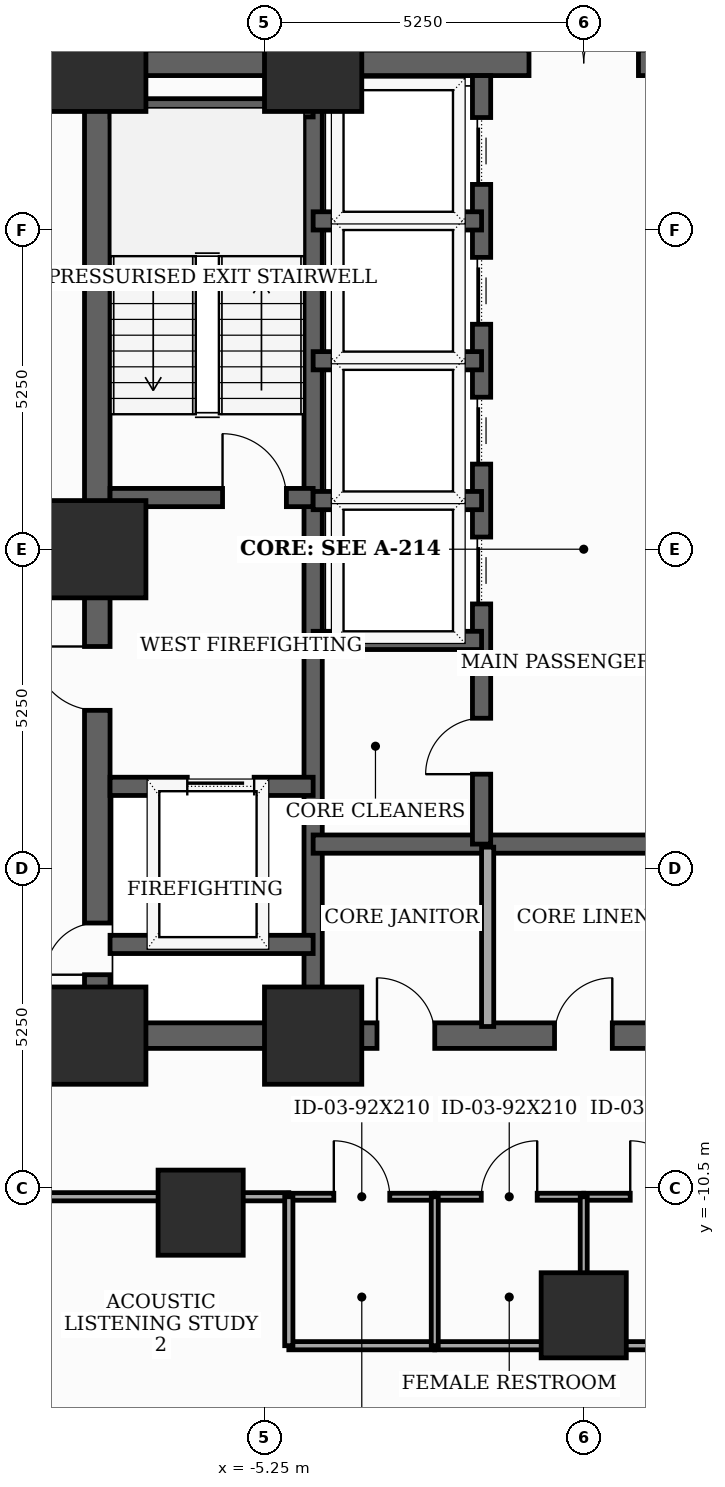
"""IFC4 building model, lengths in metres.
Left out: names, types, materials, properties, quantities, classifications, styles, units other than length and angle.
Written with IfcOpenShell. Run it as: python <this file> out.ifc"""

import sys

from ifc_helpers import new_model, si_unit, direction, frame, frame_2d, origin, origin_2d, place, context, subcontext, project, spatial, rectangle, extrude, element, fill, save


model = new_model("IFC4")
c1 = context("Model", 3, precision=1e-05, world=origin(), true_north=direction((0.0, 1.0)))
c2 = subcontext(c1, "Body", "Model", "MODEL_VIEW")
j1 = project(units=[si_unit("LENGTHUNIT", "METRE"), si_unit("PLANEANGLEUNIT", "RADIAN")], contexts=[c1])
p1 = place(None, origin())
s1 = spatial("IfcSite", under=j1, at=p1, CompositionType="ELEMENT")
p2 = place(p1, origin())
s2 = spatial("IfcBuilding", under=s1, at=p2, CompositionType="ELEMENT")
p3 = place(p2, frame((0.0, 0.0, 70.4)))
s3 = spatial("IfcBuildingStorey", under=s2, at=p3, CompositionType="ELEMENT", Elevation=70.4)
for number, where, z_axis, x_axis in (
    (1, (-8.0, -8.0, 0.0), (0.0, 0.0, 1.0), (1.0, 0.0, 0.0)),
    (2, (-4.45, -8.0, 0.0), (0.0, 0.0, 1.0), (1.0, 0.0, 0.0)),
    (3, (-4.45, 8.0, 0.0), (0.0, 0.0, 1.0), (1.0, 0.0, 0.0)),
    (4, (-8.0, 8.0, 0.0), (0.0, 0.0, 1.0), (1.0, 0.0, 0.0)),
    (5, (-8.0, 0.0, 0.0), (0.0, 0.0, 1.0), (1.0, 0.0, 0.0)),
):
    element("IfcColumn", number, at=place(p3, frame(where, z_axis=z_axis, x_axis=x_axis)), inside=s3, PredefinedType="COLUMN", context=c2, shape_type="SweptSolid", body=[
        extrude(rectangle(XDim=1.6, YDim=1.6, at=origin_2d()), origin(), (0.0, 0.0, 1.0), 3.7),
    ])
for number, where, z_axis, x_axis in (
    (6, (-6.3, -10.912, 0.0), (0.0, 0.0, 1.0), (1.0, 0.0, 0.0)),
    (7, (0.0, -12.6, 0.0), (0.0, 0.0, 1.0), (1.0, 0.0, 0.0)),
):
    element("IfcColumn", number, at=place(p3, frame(where, z_axis=z_axis, x_axis=x_axis)), inside=s3, PredefinedType="COLUMN", context=c2, shape_type="SweptSolid", body=[
        extrude(rectangle(XDim=1.4, YDim=1.4, at=origin_2d()), origin(), (0.0, 0.0, 1.0), 3.7),
    ])
p4 = place(p3, frame((-8.0, -8.0, 0.0), z_axis=(0.0, 0.0, 1.0), x_axis=(0.0, 1.0, 0.0)))
e8 = element("IfcWall", 8, at=p4, inside=s3, PredefinedType="SHEAR", context=c2, shape_type="SweptSolid", body=[
    extrude(rectangle(XDim=16.0, YDim=0.42, at=frame_2d((8.0, 0.0))), origin(), (0.0, 0.0, 1.0), 3.5),
])
p5 = place(p4, frame((1.002, 0.0, 0.0)))
e9 = element("IfcOpeningElement", 9, at=p5, cuts=e8, PredefinedType="OPENING", context=c2, shape_type="SweptSolid", body=[
    extrude(rectangle(XDim=0.85, YDim=2.02, at=frame_2d((0.425, 1.01))), frame((0.0, 0.22, 0.0), z_axis=(0.0, -1.0, 0.0), x_axis=(1.0, 0.0, 0.0)), (0.0, 0.0, 1.0), 0.44),
])
p6 = place(p4, frame((5.35, 0.0, 0.0)))
e10 = element("IfcOpeningElement", 10, at=p6, cuts=e8, PredefinedType="OPENING", context=c2, shape_type="SweptSolid", body=[
    extrude(rectangle(XDim=1.05, YDim=2.15, at=frame_2d((0.525, 1.075))), frame((0.0, 0.22, 0.0), z_axis=(0.0, -1.0, 0.0), x_axis=(1.0, 0.0, 0.0)), (0.0, 0.0, 1.0), 0.44),
])
p7 = place(p3, frame((-8.0, -8.0, 0.0), z_axis=(0.0, 0.0, 1.0), x_axis=(1.0, 0.0, 0.0)))
e11 = element("IfcWall", 11, at=p7, inside=s3, PredefinedType="SHEAR", context=c2, shape_type="SweptSolid", body=[
    extrude(rectangle(XDim=16.0, YDim=0.42, at=frame_2d((8.0, 0.0))), origin(), (0.0, 0.0, 1.0), 3.5),
])
p8 = place(p7, frame((4.6, 0.0, 0.0)))
e12 = element("IfcOpeningElement", 12, at=p8, cuts=e11, PredefinedType="OPENING", context=c2, shape_type="SweptSolid", body=[
    extrude(rectangle(XDim=0.95, YDim=2.1, at=frame_2d((0.475, 1.05))), frame((0.0, 0.22, 0.0), z_axis=(0.0, -1.0, 0.0), x_axis=(1.0, 0.0, 0.0)), (0.0, 0.0, 1.0), 0.44),
])
p9 = place(p7, frame((7.52, 0.0, 0.0)))
e13 = element("IfcOpeningElement", 13, at=p9, cuts=e11, PredefinedType="OPENING", context=c2, shape_type="SweptSolid", body=[
    extrude(rectangle(XDim=0.95, YDim=2.1, at=frame_2d((0.475, 1.05))), frame((0.0, 0.22, 0.0), z_axis=(0.0, -1.0, 0.0), x_axis=(1.0, 0.0, 0.0)), (0.0, 0.0, 1.0), 0.44),
])
p10 = place(p7, frame((10.45, 0.0, 0.0)))
e14 = element("IfcOpeningElement", 14, at=p10, cuts=e11, PredefinedType="OPENING", context=c2, shape_type="SweptSolid", body=[
    extrude(rectangle(XDim=0.95, YDim=2.1, at=frame_2d((0.475, 1.05))), frame((0.0, 0.22, 0.0), z_axis=(0.0, -1.0, 0.0), x_axis=(1.0, 0.0, 0.0)), (0.0, 0.0, 1.0), 0.44),
])
p11 = place(p3, frame((-8.0, 8.0, 0.0), z_axis=(0.0, 0.0, 1.0), x_axis=(1.0, 0.0, 0.0)))
e15 = element("IfcWall", 15, at=p11, inside=s3, PredefinedType="SHEAR", context=c2, shape_type="SweptSolid", body=[
    extrude(rectangle(XDim=16.0, YDim=0.42, at=frame_2d((8.0, 0.0))), origin(), (0.0, 0.0, 1.0), 3.5),
])
p12 = place(p11, frame((7.1, 0.0, 0.0)))
e16 = element("IfcOpeningElement", 16, at=p12, cuts=e15, PredefinedType="OPENING", context=c2, shape_type="SweptSolid", body=[
    extrude(rectangle(XDim=1.8, YDim=2.15, at=frame_2d((0.9, 1.075))), frame((0.0, 0.22, 0.0), z_axis=(0.0, -1.0, 0.0), x_axis=(1.0, 0.0, 0.0)), (0.0, 0.0, 1.0), 0.44),
])
p13 = place(p3, frame((-4.45, -7.79, 0.0), z_axis=(0.0, 0.0, 1.0), x_axis=(0.0, 1.0, 0.0)))
e17 = element("IfcWall", 17, at=p13, inside=s3, PredefinedType="SHEAR", context=c2, shape_type="SweptSolid", body=[
    extrude(rectangle(XDim=15.58, YDim=0.3, at=frame_2d((7.79, 0.0))), origin(), (0.0, 0.0, 1.0), 3.5),
])
p14 = place(p3, frame((-7.79, 0.85, 0.0), z_axis=(0.0, 0.0, 1.0), x_axis=(1.0, 0.0, 0.0)))
e18 = element("IfcWall", 18, at=p14, inside=s3, PredefinedType="SHEAR", context=c2, shape_type="SweptSolid", body=[
    extrude(rectangle(XDim=3.34, YDim=0.3, at=frame_2d((1.67, 0.0))), origin(), (0.0, 0.0, 1.0), 3.5),
])
p15 = place(p14, frame((1.85, 0.0, 0.0)))
e19 = element("IfcOpeningElement", 19, at=p15, cuts=e18, PredefinedType="OPENING", context=c2, shape_type="SweptSolid", body=[
    extrude(rectangle(XDim=1.05, YDim=2.15, at=frame_2d((0.525, 1.075))), frame((0.0, 0.16, 0.0), z_axis=(0.0, -1.0, 0.0), x_axis=(1.0, 0.0, 0.0)), (0.0, 0.0, 1.0), 0.32),
])
p16 = place(p3, frame((-7.79, 7.26, 0.0), z_axis=(0.0, 0.0, 1.0), x_axis=(1.0, 0.0, 0.0)))
e20 = element("IfcWall", 20, at=p16, inside=s3, PredefinedType="SHEAR", context=c2, shape_type="SweptSolid", body=[
    extrude(rectangle(XDim=3.34, YDim=0.3, at=frame_2d((1.67, 0.0))), origin(), (0.0, 0.0, 1.0), 3.5),
])
p17 = place(p3, frame((-7.79, -3.9, 0.0), z_axis=(0.0, 0.0, 1.0), x_axis=(1.0, 0.0, 0.0)))
e21 = element("IfcWall", 21, at=p17, inside=s3, PredefinedType="SHEAR", context=c2, shape_type="SweptSolid", body=[
    extrude(rectangle(XDim=3.34, YDim=0.3, at=frame_2d((1.67, 0.0))), origin(), (0.0, 0.0, 1.0), 3.5),
])
p18 = place(p17, frame((1.27, 0.0, 0.0)))
e22 = element("IfcOpeningElement", 22, at=p18, cuts=e21, PredefinedType="OPENING", context=c2, shape_type="SweptSolid", body=[
    extrude(rectangle(XDim=1.1, YDim=2.1, at=frame_2d((0.55, 1.05))), frame((0.0, 0.16, 0.0), z_axis=(0.0, -1.0, 0.0), x_axis=(1.0, 0.0, 0.0)), (0.0, 0.0, 1.0), 0.32),
])
p19 = place(p3, frame((-7.79, -6.5, 0.0), z_axis=(0.0, 0.0, 1.0), x_axis=(1.0, 0.0, 0.0)))
e23 = element("IfcWall", 23, at=p19, inside=s3, PredefinedType="SHEAR", context=c2, shape_type="SweptSolid", body=[
    extrude(rectangle(XDim=3.34, YDim=0.3, at=frame_2d((1.67, 0.0))), origin(), (0.0, 0.0, 1.0), 3.5),
])
p20 = place(p3, frame((-4.45, -4.85, 0.0), z_axis=(0.0, 0.0, 1.0), x_axis=(1.0, 0.0, 0.0)))
e24 = element("IfcWall", 24, at=p20, inside=s3, PredefinedType="SHEAR", context=c2, shape_type="SweptSolid", body=[
    extrude(rectangle(XDim=8.9, YDim=0.3, at=frame_2d((4.45, 0.0))), origin(), (0.0, 0.0, 1.0), 3.5),
])
p21 = place(p3, frame((-1.68, -4.85, 0.0), z_axis=(0.0, 0.0, 1.0), x_axis=(0.0, 1.0, 0.0)))
e25 = element("IfcWall", 25, at=p21, inside=s3, PredefinedType="SHEAR", context=c2, shape_type="SweptSolid", body=[
    extrude(rectangle(XDim=12.64, YDim=0.3, at=frame_2d((6.32, 0.0))), origin(), (0.0, 0.0, 1.0), 3.5),
])
p22 = place(p21, frame((3.95, 0.0, 0.0)))
e26 = element("IfcOpeningElement", 26, at=p22, cuts=e25, PredefinedType="OPENING", context=c2, shape_type="SweptSolid", body=[
    extrude(rectangle(XDim=1.1, YDim=2.1, at=frame_2d((0.55, 1.05))), frame((0.0, 0.16, 0.0), z_axis=(0.0, -1.0, 0.0), x_axis=(1.0, 0.0, 0.0)), (0.0, 0.0, 1.0), 0.32),
])
p23 = place(p21, frame((6.25, 0.0, 0.0)))
e27 = element("IfcOpeningElement", 27, at=p23, cuts=e25, PredefinedType="OPENING", context=c2, shape_type="SweptSolid", body=[
    extrude(rectangle(XDim=1.1, YDim=2.1, at=frame_2d((0.55, 1.05))), frame((0.0, 0.16, 0.0), z_axis=(0.0, -1.0, 0.0), x_axis=(1.0, 0.0, 0.0)), (0.0, 0.0, 1.0), 0.32),
])
p24 = place(p21, frame((8.55, 0.0, 0.0)))
e28 = element("IfcOpeningElement", 28, at=p24, cuts=e25, PredefinedType="OPENING", context=c2, shape_type="SweptSolid", body=[
    extrude(rectangle(XDim=1.1, YDim=2.1, at=frame_2d((0.55, 1.05))), frame((0.0, 0.16, 0.0), z_axis=(0.0, -1.0, 0.0), x_axis=(1.0, 0.0, 0.0)), (0.0, 0.0, 1.0), 0.32),
])
p25 = place(p21, frame((10.85, 0.0, 0.0)))
e29 = element("IfcOpeningElement", 29, at=p25, cuts=e25, PredefinedType="OPENING", context=c2, shape_type="SweptSolid", body=[
    extrude(rectangle(XDim=1.1, YDim=2.1, at=frame_2d((0.55, 1.05))), frame((0.0, 0.16, 0.0), z_axis=(0.0, -1.0, 0.0), x_axis=(1.0, 0.0, 0.0)), (0.0, 0.0, 1.0), 0.32),
])
p26 = place(p21, frame((1.15, 0.0, 0.0)))
e30 = element("IfcOpeningElement", 30, at=p26, cuts=e25, PredefinedType="OPENING", context=c2, shape_type="SweptSolid", body=[
    extrude(rectangle(XDim=0.92, YDim=2.1, at=frame_2d((0.46, 1.05))), frame((0.0, 0.16, 0.0), z_axis=(0.0, -1.0, 0.0), x_axis=(1.0, 0.0, 0.0)), (0.0, 0.0, 1.0), 0.32),
])
for number, where, z_axis, x_axis in (
    (31, (-4.45, -1.5, 0.0), (0.0, 0.0, 1.0), (1.0, 0.0, 0.0)),
    (32, (-4.45, 0.8, 0.0), (0.0, 0.0, 1.0), (1.0, 0.0, 0.0)),
    (33, (-4.45, 3.1, 0.0), (0.0, 0.0, 1.0), (1.0, 0.0, 0.0)),
    (34, (-4.45, 5.4, 0.0), (0.0, 0.0, 1.0), (1.0, 0.0, 0.0)),
):
    element("IfcWall", number, at=place(p3, frame(where, z_axis=z_axis, x_axis=x_axis)), inside=s3, PredefinedType="SHEAR", context=c2, shape_type="SweptSolid", body=[
        extrude(rectangle(XDim=2.77, YDim=0.3, at=frame_2d((1.385, 0.0))), origin(), (0.0, 0.0, 1.0), 3.5),
    ])
p27 = place(p3, frame((-1.58, -7.85, 0.0), z_axis=(0.0, 0.0, 1.0), x_axis=(0.0, 1.0, 0.0)))
e35 = element("IfcWall", 35, at=p27, inside=s3, PredefinedType="SOLIDWALL", context=c2, shape_type="SweptSolid", body=[
    extrude(rectangle(XDim=2.95, YDim=0.2, at=frame_2d((1.475, 0.0))), origin(), (0.0, 0.0, 1.0), 2.885),
])
p28 = place(p3, frame((-10.15, -10.65, 0.0), z_axis=(0.0, 0.0, 1.0), x_axis=(1.0, 0.0, 0.0)))
e36 = element("IfcWall", 36, at=p28, inside=s3, PredefinedType="PARTITIONING", context=c2, shape_type="SweptSolid", body=[
    extrude(rectangle(XDim=5.3, YDim=0.135, at=frame_2d((2.65, 0.0))), origin(), (0.0, 0.0, 1.0), 2.785),
])
p29 = place(p3, frame((-4.85, -10.65, 0.0), z_axis=(0.0, 0.0, 1.0), x_axis=(1.0, 0.0, 0.0)))
e37 = element("IfcWall", 37, at=p29, inside=s3, PredefinedType="PARTITIONING", context=c2, shape_type="SweptSolid", body=[
    extrude(rectangle(XDim=2.4, YDim=0.115, at=frame_2d((1.2, 0.0))), origin(), (0.0, 0.0, 1.0), 3.5),
])
p30 = place(p29, frame((0.74, 0.0, 0.0)))
e38 = element("IfcOpeningElement", 38, at=p30, cuts=e37, PredefinedType="OPENING", context=c2, shape_type="SweptSolid", body=[
    extrude(rectangle(XDim=0.92, YDim=2.1, at=frame_2d((0.46, 1.05))), frame((0.0, 0.067, 0.0), z_axis=(0.0, -1.0, 0.0), x_axis=(1.0, 0.0, 0.0)), (0.0, 0.0, 1.0), 0.135),
])
p31 = place(p3, frame((-2.45, -10.65, 0.0), z_axis=(0.0, 0.0, 1.0), x_axis=(1.0, 0.0, 0.0)))
e39 = element("IfcWall", 39, at=p31, inside=s3, PredefinedType="PARTITIONING", context=c2, shape_type="SweptSolid", body=[
    extrude(rectangle(XDim=2.45, YDim=0.115, at=frame_2d((1.225, 0.0))), origin(), (0.0, 0.0, 1.0), 2.785),
])
p32 = place(p31, frame((0.765, 0.0, 0.0)))
e40 = element("IfcOpeningElement", 40, at=p32, cuts=e39, PredefinedType="OPENING", context=c2, shape_type="SweptSolid", body=[
    extrude(rectangle(XDim=0.92, YDim=2.1, at=frame_2d((0.46, 1.05))), frame((0.0, 0.067, 0.0), z_axis=(0.0, -1.0, 0.0), x_axis=(1.0, 0.0, 0.0)), (0.0, 0.0, 1.0), 0.135),
])
p33 = place(p3, frame((0.0, -10.65, 0.0), z_axis=(0.0, 0.0, 1.0), x_axis=(1.0, 0.0, 0.0)))
e41 = element("IfcWall", 41, at=p33, inside=s3, PredefinedType="PARTITIONING", context=c2, shape_type="SweptSolid", body=[
    extrude(rectangle(XDim=2.45, YDim=0.115, at=frame_2d((1.225, 0.0))), origin(), (0.0, 0.0, 1.0), 3.5),
])
p34 = place(p33, frame((0.765, 0.0, 0.0)))
e42 = element("IfcOpeningElement", 42, at=p34, cuts=e41, PredefinedType="OPENING", context=c2, shape_type="SweptSolid", body=[
    extrude(rectangle(XDim=0.92, YDim=2.1, at=frame_2d((0.46, 1.05))), frame((0.0, 0.067, 0.0), z_axis=(0.0, -1.0, 0.0), x_axis=(1.0, 0.0, 0.0)), (0.0, 0.0, 1.0), 0.135),
])
p35 = place(p3, frame((-9.328, -14.093, 0.0), z_axis=(0.0, 0.0, 1.0), x_axis=(0.928830986118, -0.370503710139, 0.0)))
e43 = element("IfcWall", 43, at=p35, inside=s3, PredefinedType="PARTITIONING", context=c2, shape_type="SweptSolid", body=[
    extrude(rectangle(XDim=6.883, YDim=0.135, at=frame_2d((3.441, 0.0))), origin(), (0.0, 0.0, 1.0), 2.785),
])
p36 = place(p3, frame((-2.45, -13.1, 0.0), z_axis=(0.0, 0.0, 1.0), x_axis=(-1.0, 0.0, 0.0)))
e44 = element("IfcWall", 44, at=p36, inside=s3, PredefinedType="PARTITIONING", context=c2, shape_type="SweptSolid", body=[
    extrude(rectangle(XDim=2.4, YDim=0.135, at=frame_2d((1.2, 0.0))), origin(), (0.0, 0.0, 1.0), 3.5),
])
p37 = place(p3, frame((-4.85, -13.1, 0.0), z_axis=(0.0, 0.0, 1.0), x_axis=(0.0, 1.0, 0.0)))
e45 = element("IfcWall", 45, at=p37, inside=s3, PredefinedType="PARTITIONING", context=c2, shape_type="SweptSolid", body=[
    extrude(rectangle(XDim=2.45, YDim=0.135, at=frame_2d((1.225, 0.0))), origin(), (0.0, 0.0, 1.0), 2.785),
])
for number, where, z_axis, x_axis in (
    (46, (0.0, -13.1, 0.0), (0.0, 0.0, 1.0), (-1.0, 0.0, 0.0)),
    (47, (2.45, -13.1, 0.0), (0.0, 0.0, 1.0), (-1.0, 0.0, 0.0)),
):
    element("IfcWall", number, at=place(p3, frame(where, z_axis=z_axis, x_axis=x_axis)), inside=s3, PredefinedType="PARTITIONING", context=c2, shape_type="SweptSolid", body=[
        extrude(rectangle(XDim=2.45, YDim=0.135, at=frame_2d((1.225, 0.0))), origin(), (0.0, 0.0, 1.0), 2.785),
    ])
for number, where, z_axis, x_axis in (
    (48, (-2.45, -13.1, 0.0), (0.0, 0.0, 1.0), (0.0, 1.0, 0.0)),
    (49, (0.0, -13.1, 0.0), (0.0, 0.0, 1.0), (0.0, 1.0, 0.0)),
):
    element("IfcWall", number, at=place(p3, frame(where, z_axis=z_axis, x_axis=x_axis)), inside=s3, PredefinedType="PARTITIONING", context=c2, shape_type="SweptSolid", body=[
        extrude(rectangle(XDim=2.45, YDim=0.115, at=frame_2d((1.225, 0.0))), origin(), (0.0, 0.0, 1.0), 2.785),
    ])
p38 = place(p5, origin())
e50 = element("IfcDoor", 50, at=p38, inside=s3, OperationType="SINGLE_SWING_LEFT", PredefinedType="TRAPDOOR", context=c2, shape_type="SweptSolid", body=[
    extrude(rectangle(XDim=0.85, YDim=2.02, at=frame_2d((0.425, 1.01))), frame((0.0, 0.025, 0.0), z_axis=(0.0, -1.0, 0.0), x_axis=(1.0, 0.0, 0.0)), (0.0, 0.0, 1.0), 0.05),
])
fill(e9, e50)
p39 = place(p6, origin())
e51 = element("IfcDoor", 51, at=p39, inside=s3, OperationType="SINGLE_SWING_RIGHT", PredefinedType="DOOR", context=c2, shape_type="SweptSolid", body=[
    extrude(rectangle(XDim=1.05, YDim=2.15, at=frame_2d((0.525, 1.075))), frame((0.0, 0.025, 0.0), z_axis=(0.0, -1.0, 0.0), x_axis=(1.0, 0.0, 0.0)), (0.0, 0.0, 1.0), 0.05),
])
fill(e10, e51)
p40 = place(p8, origin())
e52 = element("IfcDoor", 52, at=p40, inside=s3, OperationType="SINGLE_SWING_LEFT", PredefinedType="DOOR", context=c2, shape_type="SweptSolid", body=[
    extrude(rectangle(XDim=0.95, YDim=2.1, at=frame_2d((0.475, 1.05))), frame((0.0, 0.025, 0.0), z_axis=(0.0, -1.0, 0.0), x_axis=(1.0, 0.0, 0.0)), (0.0, 0.0, 1.0), 0.05),
])
fill(e12, e52)
p41 = place(p9, origin())
e53 = element("IfcDoor", 53, at=p41, inside=s3, OperationType="SINGLE_SWING_RIGHT", PredefinedType="DOOR", context=c2, shape_type="SweptSolid", body=[
    extrude(rectangle(XDim=0.95, YDim=2.1, at=frame_2d((0.475, 1.05))), frame((0.0, 0.025, 0.0), z_axis=(0.0, -1.0, 0.0), x_axis=(1.0, 0.0, 0.0)), (0.0, 0.0, 1.0), 0.05),
])
fill(e13, e53)
p42 = place(p12, origin())
e54 = element("IfcDoor", 54, at=p42, inside=s3, OperationType="DOUBLE_DOOR_SINGLE_SWING", PredefinedType="DOOR", context=c2, shape_type="SweptSolid", body=[
    extrude(rectangle(XDim=1.8, YDim=2.15, at=frame_2d((0.9, 1.075))), frame((0.0, 0.025, 0.0), z_axis=(0.0, -1.0, 0.0), x_axis=(1.0, 0.0, 0.0)), (0.0, 0.0, 1.0), 0.05),
])
fill(e16, e54)
p43 = place(p15, origin())
e55 = element("IfcDoor", 55, at=p43, inside=s3, OperationType="SINGLE_SWING_LEFT", PredefinedType="DOOR", context=c2, shape_type="SweptSolid", body=[
    extrude(rectangle(XDim=1.05, YDim=2.15, at=frame_2d((0.525, 1.075))), frame((0.0, 0.025, 0.0), z_axis=(0.0, -1.0, 0.0), x_axis=(1.0, 0.0, 0.0)), (0.0, 0.0, 1.0), 0.05),
])
fill(e19, e55)
p44 = place(p18, origin())
e56 = element("IfcDoor", 56, at=p44, inside=s3, OperationType="SLIDING_TO_LEFT", PredefinedType="DOOR", context=c2, shape_type="SweptSolid", body=[
    extrude(rectangle(XDim=1.1, YDim=2.1, at=frame_2d((0.55, 1.05))), frame((0.0, 0.025, 0.0), z_axis=(0.0, -1.0, 0.0), x_axis=(1.0, 0.0, 0.0)), (0.0, 0.0, 1.0), 0.05),
])
fill(e22, e56)
p45 = place(p22, origin())
e57 = element("IfcDoor", 57, at=p45, inside=s3, OperationType="SLIDING_TO_LEFT", PredefinedType="DOOR", context=c2, shape_type="SweptSolid", body=[
    extrude(rectangle(XDim=1.1, YDim=2.1, at=frame_2d((0.55, 1.05))), frame((0.0, 0.025, 0.0), z_axis=(0.0, -1.0, 0.0), x_axis=(1.0, 0.0, 0.0)), (0.0, 0.0, 1.0), 0.05),
])
fill(e26, e57)
p46 = place(p23, origin())
e58 = element("IfcDoor", 58, at=p46, inside=s3, OperationType="SLIDING_TO_LEFT", PredefinedType="DOOR", context=c2, shape_type="SweptSolid", body=[
    extrude(rectangle(XDim=1.1, YDim=2.1, at=frame_2d((0.55, 1.05))), frame((0.0, 0.025, 0.0), z_axis=(0.0, -1.0, 0.0), x_axis=(1.0, 0.0, 0.0)), (0.0, 0.0, 1.0), 0.05),
])
fill(e27, e58)
p47 = place(p24, origin())
e59 = element("IfcDoor", 59, at=p47, inside=s3, OperationType="SLIDING_TO_LEFT", PredefinedType="DOOR", context=c2, shape_type="SweptSolid", body=[
    extrude(rectangle(XDim=1.1, YDim=2.1, at=frame_2d((0.55, 1.05))), frame((0.0, 0.025, 0.0), z_axis=(0.0, -1.0, 0.0), x_axis=(1.0, 0.0, 0.0)), (0.0, 0.0, 1.0), 0.05),
])
fill(e28, e59)
p48 = place(p25, origin())
e60 = element("IfcDoor", 60, at=p48, inside=s3, OperationType="SLIDING_TO_LEFT", PredefinedType="DOOR", context=c2, shape_type="SweptSolid", body=[
    extrude(rectangle(XDim=1.1, YDim=2.1, at=frame_2d((0.55, 1.05))), frame((0.0, 0.025, 0.0), z_axis=(0.0, -1.0, 0.0), x_axis=(1.0, 0.0, 0.0)), (0.0, 0.0, 1.0), 0.05),
])
fill(e29, e60)
p49 = place(p26, origin())
e61 = element("IfcDoor", 61, at=p49, inside=s3, OperationType="SINGLE_SWING_LEFT", PredefinedType="DOOR", context=c2, shape_type="SweptSolid", body=[
    extrude(rectangle(XDim=0.92, YDim=2.1, at=frame_2d((0.46, 1.05))), frame((0.0, 0.025, 0.0), z_axis=(0.0, -1.0, 0.0), x_axis=(1.0, 0.0, 0.0)), (0.0, 0.0, 1.0), 0.05),
])
fill(e30, e61)
p50 = place(p30, origin())
e62 = element("IfcDoor", 62, at=p50, inside=s3, OperationType="SINGLE_SWING_LEFT", PredefinedType="DOOR", context=c2, shape_type="SweptSolid", body=[
    extrude(rectangle(XDim=0.92, YDim=2.1, at=frame_2d((0.46, 1.05))), frame((0.0, 0.025, 0.0), z_axis=(0.0, -1.0, 0.0), x_axis=(1.0, 0.0, 0.0)), (0.0, 0.0, 1.0), 0.05),
])
fill(e38, e62)
p51 = place(p32, origin())
e63 = element("IfcDoor", 63, at=p51, inside=s3, OperationType="SINGLE_SWING_RIGHT", PredefinedType="DOOR", context=c2, shape_type="SweptSolid", body=[
    extrude(rectangle(XDim=0.92, YDim=2.1, at=frame_2d((0.46, 1.05))), frame((0.0, 0.025, 0.0), z_axis=(0.0, -1.0, 0.0), x_axis=(1.0, 0.0, 0.0)), (0.0, 0.0, 1.0), 0.05),
])
fill(e40, e63)
p52 = place(p34, origin())
e64 = element("IfcDoor", 64, at=p52, inside=s3, OperationType="SINGLE_SWING_LEFT", PredefinedType="DOOR", context=c2, shape_type="SweptSolid", body=[
    extrude(rectangle(XDim=0.92, YDim=2.1, at=frame_2d((0.46, 1.05))), frame((0.0, 0.025, 0.0), z_axis=(0.0, -1.0, 0.0), x_axis=(1.0, 0.0, 0.0)), (0.0, 0.0, 1.0), 0.05),
])
fill(e42, e64)
save(model, sys.argv[1])
